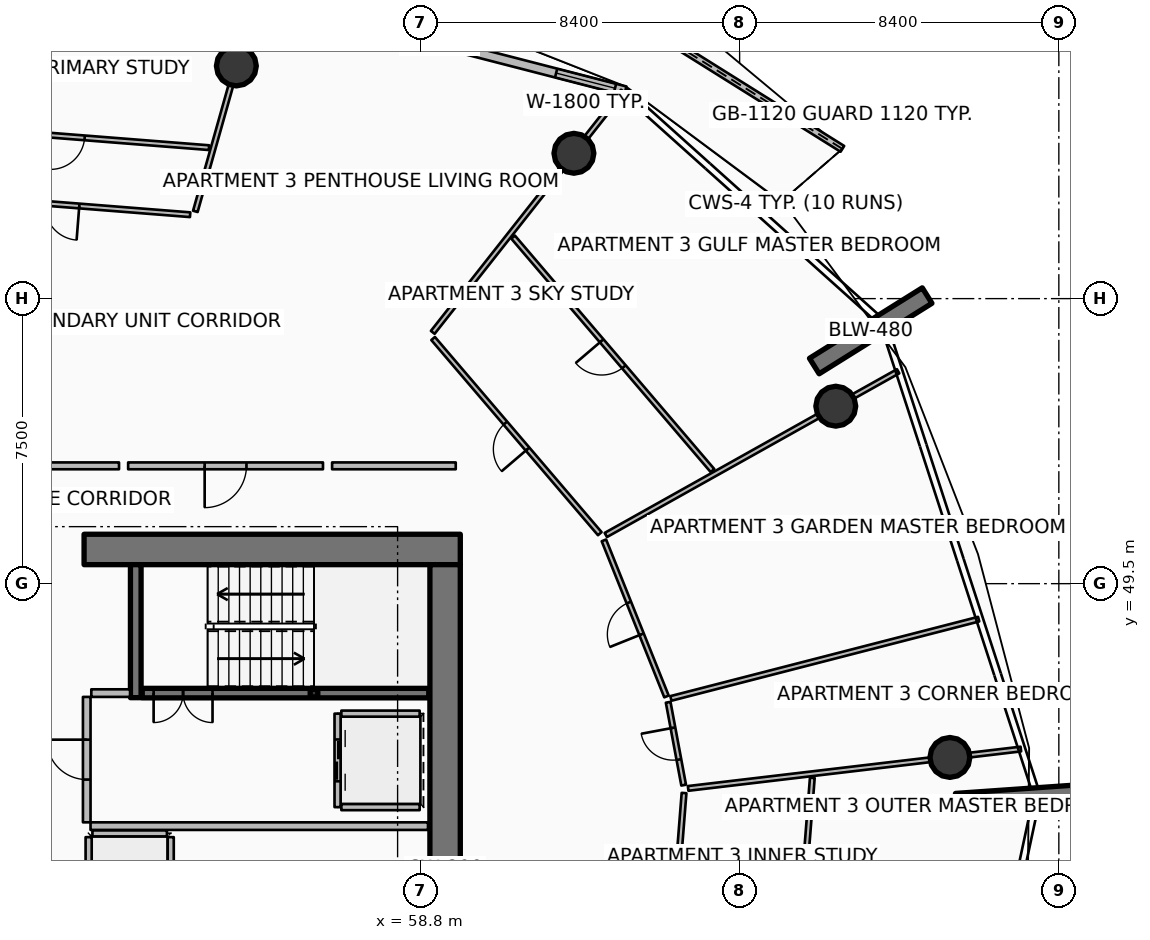
"""IFC4 building model, lengths in metres.
Left out: names, types, materials, properties, quantities, classifications, styles, units other than length and angle.
Written with IfcOpenShell. Run it as: python <this file> out.ifc"""

import sys

from ifc_helpers import new_model, si_unit, direction, frame, frame_2d, origin, origin_2d, place, context, subcontext, project, spatial, polyline, rectangle, hollow_rectangle, circle, outline, extrude, element, fill, save


model = new_model("IFC4")
c1 = context("Model", 3, precision=1e-05, world=origin(), true_north=direction((0.0, 1.0)))
c2 = subcontext(c1, "Body", "Model", "MODEL_VIEW")
j1 = project(units=[si_unit("LENGTHUNIT", "METRE"), si_unit("PLANEANGLEUNIT", "RADIAN")], contexts=[c1])
p1 = place(None, origin())
s1 = spatial("IfcSite", under=j1, at=p1, CompositionType="ELEMENT")
p2 = place(p1, origin())
s2 = spatial("IfcBuilding", under=s1, at=p2, CompositionType="ELEMENT")
p3 = place(p2, frame((0.0, 0.0, 161.55)))
s3 = spatial("IfcBuildingStorey", under=s2, at=p3, CompositionType="ELEMENT", Elevation=161.55)
p4 = place(p3, frame((49.95, 50.4, 0.0), z_axis=(0.0, 0.0, 1.0), x_axis=(1.0, 0.0, 0.0)))
e1 = element("IfcWall", 1, at=p4, inside=s3, PredefinedType="SHEAR", context=c2, shape_type="SweptSolid", body=[
    extrude(rectangle(XDim=9.9, YDim=0.8, at=frame_2d((4.95, 0.0))), origin(), (0.0, 0.0, 1.0), 3.75),
])
p5 = place(p3, frame((59.45, 34.0, 0.0), z_axis=(0.0, 0.0, 1.0), x_axis=(0.0, 1.0, 0.0)))
e2 = element("IfcWall", 2, at=p5, inside=s3, PredefinedType="SHEAR", context=c2, shape_type="SweptSolid", body=[
    extrude(rectangle(XDim=16.0, YDim=0.8, at=frame_2d((8.0, 0.0))), origin(), (0.0, 0.0, 1.0), 3.75),
])
p6 = place(p3, frame((51.31, 46.5, 0.0), z_axis=(0.0, 0.0, 1.0), x_axis=(0.0, 1.0, 0.0)))
e3 = element("IfcWall", 3, at=p6, inside=s3, PredefinedType="SHEAR", context=c2, shape_type="SweptSolid", body=[
    extrude(rectangle(XDim=3.5, YDim=0.28, at=frame_2d((1.75, 0.0))), origin(), (0.0, 0.0, 1.0), 3.75),
])
p7 = place(p3, frame((56.0, 46.62, 0.0), z_axis=(0.0, 0.0, 1.0), x_axis=(1.0, 0.0, 0.0)))
e4 = element("IfcColumn", 4, at=p7, inside=s3, PredefinedType="COLUMN", context=c2, shape_type="SweptSolid", body=[
    extrude(hollow_rectangle(XDim=0.2, YDim=0.2, WallThickness=0.01, InnerFilletRadius=0.01, OuterFilletRadius=0.02, at=origin_2d()), origin(), (0.0, 0.0, 1.0), 1.67),
])
for number, where, z_axis, x_axis in (
    (5, (69.165, 55.226, 0.0), (0.0, 0.0, 1.0), (0.848, 0.53, 0.0)),
    (6, (72.897, 43.741, 0.0), (0.0, 0.0, 1.0), (0.998, 0.07, 0.0)),
):
    element("IfcWall", number, at=place(p3, frame(where, z_axis=z_axis, x_axis=x_axis)), inside=s3, PredefinedType="SOLIDWALL", context=c2, shape_type="SweptSolid", body=[
        extrude(rectangle(XDim=3.5, YDim=0.48, at=frame_2d((1.75, 0.0))), origin(), (0.0, 0.0, 1.0), 3.75),
    ])
for number, where, z_axis, x_axis in (
    (7, (69.73, 54.169, 0.0), (0.0, 0.0, 1.0), (1.0, 0.0, 0.0)),
    (8, (62.84, 60.824, 0.0), (0.0, 0.0, 1.0), (1.0, 0.0, 0.0)),
    (9, (53.957, 63.122, 0.0), (0.0, 0.0, 1.0), (1.0, 0.0, 0.0)),
    (10, (72.733, 44.927, 0.0), (0.0, 0.0, 1.0), (1.0, 0.0, 0.0)),
):
    element("IfcColumn", number, at=place(p3, frame(where, z_axis=z_axis, x_axis=x_axis)), inside=s3, PredefinedType="COLUMN", context=c2, shape_type="SweptSolid", body=[
        extrude(circle(Radius=0.525, at=origin_2d()), origin(), (0.0, 0.0, 1.0), 3.5),
    ])
p8 = place(p3, frame((69.904, 60.94, 0.0), z_axis=(0.0, 0.0, 1.0), x_axis=(-0.847688171498, 0.53049482929, 0.0)))
e11 = element("IfcWall", 11, at=p8, inside=s3, PredefinedType="PARAPET", context=c2, shape_type="SweptSolid", body=[
    extrude(outline(polyline([(0.0, 0.0), (10.84, 0.0), (10.84, 1.832), (5.42, 1.696), (0.0, 1.497), (0.0, 0.0)])), frame((0.0, 0.09, 0.0), z_axis=(0.0, -1.0, 0.0), x_axis=(1.0, 0.0, 0.0)), (0.0, 0.0, 1.0), 0.18),
])
p9 = place(p3, frame((64.192, 62.466, 0.0), z_axis=(0.0, 0.0, 1.0), x_axis=(-0.968379685126, 0.249481032214, 0.0)))
e12 = element("IfcWall", 12, at=p9, inside=s3, PredefinedType="SOLIDWALL", context=c2, shape_type="SweptSolid", body=[
    extrude(rectangle(XDim=10.082, YDim=0.24, at=frame_2d((5.041, 0.0))), origin(), (0.0, 0.0, 1.0), 2.45),
])
p10 = place(p9, frame((7.862, 0.0, 0.0)))
e13 = element("IfcOpeningElement", 13, at=p10, cuts=e12, PredefinedType="OPENING", context=c2, shape_type="SweptSolid", body=[
    extrude(rectangle(XDim=1.45, YDim=2.15, at=frame_2d((0.725, 1.075))), frame((0.0, 0.13, 0.0), z_axis=(0.0, -1.0, 0.0), x_axis=(1.0, 0.0, 0.0)), (0.0, 0.0, 1.0), 0.26),
])
p11 = place(p9, frame((0.28, 0.0, 0.65)))
e14 = element("IfcOpeningElement", 14, at=p11, cuts=e12, PredefinedType="OPENING", context=c2, shape_type="SweptSolid", body=[
    extrude(rectangle(XDim=1.6, YDim=1.5, at=frame_2d((0.8, 0.75))), frame((0.0, 0.13, 0.0), z_axis=(0.0, -1.0, 0.0), x_axis=(1.0, 0.0, 0.0)), (0.0, 0.0, 1.0), 0.26),
])
p12 = place(p3, frame((51.48, 46.62, 0.0), z_axis=(0.0, 0.0, 1.0), x_axis=(1.0, 0.0, 0.0)))
e15 = element("IfcWall", 15, at=p12, inside=s3, PredefinedType="SOLIDWALL", context=c2, shape_type="SweptSolid", body=[
    extrude(rectangle(XDim=7.54, YDim=0.25, at=frame_2d((3.77, 0.0))), origin(), (0.0, 0.0, 1.0), 3.5),
])
p13 = place(p12, frame((0.3, 0.0, 0.0)))
e16 = element("IfcOpeningElement", 16, at=p13, cuts=e15, PredefinedType="OPENING", context=c2, shape_type="SweptSolid", body=[
    extrude(rectangle(XDim=1.55, YDim=2.15, at=frame_2d((0.775, 1.075))), frame((0.0, 0.135, 0.0), z_axis=(0.0, -1.0, 0.0), x_axis=(1.0, 0.0, 0.0)), (0.0, 0.0, 1.0), 0.27),
])
p14 = place(p3, frame((56.62, 46.08, 0.0), z_axis=(0.0, 0.0, 1.0), x_axis=(0.0, -1.0, 0.0)))
e17 = element("IfcWall", 17, at=p14, inside=s3, PredefinedType="PARTITIONING", context=c2, shape_type="SweptSolid", body=[
    extrude(rectangle(XDim=2.46, YDim=0.16, at=frame_2d((1.23, 0.0))), origin(), (0.0, 0.0, 1.0), 3.5),
])
p15 = place(p14, frame((0.68, 0.0, 0.0)))
e18 = element("IfcOpeningElement", 18, at=p15, cuts=e17, PredefinedType="OPENING", context=c2, shape_type="SweptSolid", body=[
    extrude(rectangle(XDim=1.1, YDim=2.1, at=frame_2d((0.55, 1.05))), frame((0.0, 0.09, 0.0), z_axis=(0.0, -1.0, 0.0), x_axis=(1.0, 0.0, 0.0)), (0.0, 0.0, 1.0), 0.18),
])
for number, where, z_axis, x_axis in (
    (19, (56.72, 46.08, 0.0), (0.0, 0.0, 1.0), (1.0, 0.0, 0.0)),
    (20, (56.72, 43.62, 0.0), (0.0, 0.0, 1.0), (1.0, 0.0, 0.0)),
):
    element("IfcWall", number, at=place(p3, frame(where, z_axis=z_axis, x_axis=x_axis)), inside=s3, PredefinedType="PARTITIONING", context=c2, shape_type="SweptSolid", body=[
        extrude(rectangle(XDim=2.06, YDim=0.16, at=frame_2d((1.03, 0.0))), origin(), (0.0, 0.0, 1.0), 3.5),
    ])
for number, where, z_axis, x_axis in (
    (21, (52.23, 40.67, 0.0), (0.0, 0.0, 1.0), (0.0, 1.0, 0.0)),
    (22, (50.07, 40.67, 0.0), (0.0, 0.0, 1.0), (0.0, 1.0, 0.0)),
):
    element("IfcWall", number, at=place(p3, frame(where, z_axis=z_axis, x_axis=x_axis)), inside=s3, PredefinedType="PARTITIONING", context=c2, shape_type="SweptSolid", body=[
        extrude(rectangle(XDim=2.16, YDim=0.16, at=frame_2d((1.08, 0.0))), origin(), (0.0, 0.0, 1.0), 3.5),
    ])
p16 = place(p3, frame((50.17, 42.93, 0.0), z_axis=(0.0, 0.0, 1.0), x_axis=(1.0, 0.0, 0.0)))
e23 = element("IfcWall", 23, at=p16, inside=s3, PredefinedType="PARTITIONING", context=c2, shape_type="SweptSolid", body=[
    extrude(rectangle(XDim=1.96, YDim=0.16, at=frame_2d((0.98, 0.0))), origin(), (0.0, 0.0, 1.0), 3.5),
])
p17 = place(p3, frame((50.12, 43.12, 0.0), z_axis=(0.0, 0.0, 1.0), x_axis=(1.0, 0.0, 0.0)))
e24 = element("IfcWall", 24, at=p17, inside=s3, PredefinedType="PARTITIONING", context=c2, shape_type="SweptSolid", body=[
    extrude(rectangle(XDim=8.88, YDim=0.2, at=frame_2d((4.44, 0.0))), origin(), (0.0, 0.0, 1.0), 3.5),
])
p18 = place(p3, frame((50.14, 46.62, 0.0), z_axis=(0.0, 0.0, 1.0), x_axis=(1.0, 0.0, 0.0)))
e25 = element("IfcWall", 25, at=p18, inside=s3, PredefinedType="PARTITIONING", context=c2, shape_type="SweptSolid", body=[
    extrude(rectangle(XDim=1.02, YDim=0.2, at=frame_2d((0.51, 0.0))), origin(), (0.0, 0.0, 1.0), 3.5),
])
p19 = place(p3, frame((50.02, 43.22, 0.0), z_axis=(0.0, 0.0, 1.0), x_axis=(0.0, 1.0, 0.0)))
e26 = element("IfcWall", 26, at=p19, inside=s3, PredefinedType="PARTITIONING", context=c2, shape_type="SweptSolid", body=[
    extrude(rectangle(XDim=3.3, YDim=0.2, at=frame_2d((1.65, 0.0))), origin(), (0.0, 0.0, 1.0), 3.5),
])
p20 = place(p19, frame((1.125, 0.0, 0.0)))
e27 = element("IfcOpeningElement", 27, at=p20, cuts=e26, PredefinedType="OPENING", context=c2, shape_type="SweptSolid", body=[
    extrude(rectangle(XDim=1.05, YDim=2.1, at=frame_2d((0.525, 1.05))), frame((0.0, 0.11, 0.0), z_axis=(0.0, -1.0, 0.0), x_axis=(1.0, 0.0, 0.0)), (0.0, 0.0, 1.0), 0.22),
])
p21 = place(p3, frame((56.236, 52.6, 0.0), z_axis=(0.0, 0.0, 1.0), x_axis=(-1.0, 0.0, 0.0)))
e28 = element("IfcWall", 28, at=p21, inside=s3, PredefinedType="PARTITIONING", context=c2, shape_type="SweptSolid", body=[
    extrude(rectangle(XDim=5.127, YDim=0.18, at=frame_2d((2.563, 0.0))), origin(), (0.0, 0.0, 1.0), 2.94),
])
p22 = place(p21, frame((2.013, 0.0, 0.0)))
e29 = element("IfcOpeningElement", 29, at=p22, cuts=e28, PredefinedType="OPENING", context=c2, shape_type="SweptSolid", body=[
    extrude(rectangle(XDim=1.1, YDim=2.1, at=frame_2d((0.55, 1.05))), frame((0.0, 0.1, 0.0), z_axis=(0.0, -1.0, 0.0), x_axis=(1.0, 0.0, 0.0)), (0.0, 0.0, 1.0), 0.2),
])
p23 = place(p3, frame((65.208, 37.259, 0.0), z_axis=(0.0, 0.0, 1.0), x_axis=(0.078457580711, 0.996917452966, 0.0)))
e30 = element("IfcWall", 30, at=p23, inside=s3, PredefinedType="PARTITIONING", context=c2, shape_type="SweptSolid", body=[
    extrude(rectangle(XDim=6.752, YDim=0.125, at=frame_2d((3.376, 0.0))), origin(), (0.0, 0.0, 1.0), 2.94),
])
p24 = place(p23, frame((2.926, 0.0, 0.0)))
e31 = element("IfcOpeningElement", 31, at=p24, cuts=e30, PredefinedType="OPENING", context=c2, shape_type="SweptSolid", body=[
    extrude(rectangle(XDim=0.9, YDim=2.08, at=frame_2d((0.45, 1.04))), frame((0.0, 0.073, 0.0), z_axis=(0.0, -1.0, 0.0), x_axis=(1.0, 0.0, 0.0)), (0.0, 0.0, 1.0), 0.145),
])
p25 = place(p3, frame((68.479, 36.336, 0.0), z_axis=(0.0, 0.0, 1.0), x_axis=(0.078482765766, 0.996915470578, 0.0)))
e32 = element("IfcWall", 32, at=p25, inside=s3, PredefinedType="PARTITIONING", context=c2, shape_type="SweptSolid", body=[
    extrude(rectangle(XDim=8.079, YDim=0.125, at=frame_2d((4.039, 0.0))), origin(), (0.0, 0.0, 1.0), 2.94),
])
p26 = place(p25, frame((3.589, 0.0, 0.0)))
e33 = element("IfcOpeningElement", 33, at=p26, cuts=e32, PredefinedType="OPENING", context=c2, shape_type="SweptSolid", body=[
    extrude(rectangle(XDim=0.9, YDim=2.08, at=frame_2d((0.45, 1.04))), frame((0.0, 0.073, 0.0), z_axis=(0.0, -1.0, 0.0), x_axis=(1.0, 0.0, 0.0)), (0.0, 0.0, 1.0), 0.145),
])
p27 = place(p3, frame((65.845, 44.112, 0.0), z_axis=(0.0, 0.0, 1.0), x_axis=(0.993069843717, 0.117525680174, 0.0)))
e34 = element("IfcWall", 34, at=p27, inside=s3, PredefinedType="PARTITIONING", context=c2, shape_type="SweptSolid", body=[
    extrude(rectangle(XDim=8.816, YDim=0.125, at=frame_2d((4.408, 0.0))), origin(), (0.0, 0.0, 1.0), 2.94),
])
p28 = place(p3, frame((65.392, 46.48, 0.0), z_axis=(0.0, 0.0, 1.0), x_axis=(0.968391846752, 0.249433821172, 0.0)))
e35 = element("IfcWall", 35, at=p28, inside=s3, PredefinedType="PARTITIONING", context=c2, shape_type="SweptSolid", body=[
    extrude(rectangle(XDim=8.362, YDim=0.125, at=frame_2d((4.181, 0.0))), origin(), (0.0, 0.0, 1.0), 2.94),
])
p29 = place(p3, frame((65.728, 44.199, 0.0), z_axis=(0.0, 0.0, 1.0), x_axis=(-0.183909749888, 0.982943133602, 0.0)))
e36 = element("IfcWall", 36, at=p29, inside=s3, PredefinedType="PARTITIONING", context=c2, shape_type="SweptSolid", body=[
    extrude(rectangle(XDim=2.218, YDim=0.125, at=frame_2d((1.109, 0.0))), origin(), (0.0, 0.0, 1.0), 2.94),
])
p30 = place(p29, frame((0.684, 0.0, 0.0)))
e37 = element("IfcOpeningElement", 37, at=p30, cuts=e36, PredefinedType="OPENING", context=c2, shape_type="SweptSolid", body=[
    extrude(rectangle(XDim=0.85, YDim=2.06, at=frame_2d((0.425, 1.03))), frame((0.0, 0.073, 0.0), z_axis=(0.0, -1.0, 0.0), x_axis=(1.0, 0.0, 0.0)), (0.0, 0.0, 1.0), 0.145),
])
p31 = place(p3, frame((65.275, 46.532, 0.0), z_axis=(0.0, 0.0, 1.0), x_axis=(-0.372161107737, 0.928168147421, 0.0)))
e38 = element("IfcWall", 38, at=p31, inside=s3, PredefinedType="PARTITIONING", context=c2, shape_type="SweptSolid", body=[
    extrude(rectangle(XDim=4.425, YDim=0.125, at=frame_2d((2.212, 0.0))), origin(), (0.0, 0.0, 1.0), 2.94),
])
p32 = place(p31, frame((1.762, 0.0, 0.0)))
e39 = element("IfcOpeningElement", 39, at=p32, cuts=e38, PredefinedType="OPENING", context=c2, shape_type="SweptSolid", body=[
    extrude(rectangle(XDim=0.9, YDim=2.08, at=frame_2d((0.45, 1.04))), frame((0.0, 0.073, 0.0), z_axis=(0.0, -1.0, 0.0), x_axis=(1.0, 0.0, 0.0)), (0.0, 0.0, 1.0), 0.145),
])
p33 = place(p3, frame((59.73, 52.6, 0.0), z_axis=(0.0, 0.0, 1.0), x_axis=(-1.0, 0.0, 0.0)))
e40 = element("IfcWall", 40, at=p33, inside=s3, PredefinedType="PARTITIONING", context=c2, shape_type="SweptSolid", body=[
    extrude(rectangle(XDim=3.254, YDim=0.18, at=frame_2d((1.627, 0.0))), origin(), (0.0, 0.0, 1.0), 2.94),
])
p34 = place(p3, frame((63.679, 50.781, 0.0), z_axis=(0.0, 0.0, 1.0), x_axis=(0.872493265844, 0.488626136281, 0.0)))
e41 = element("IfcWall", 41, at=p34, inside=s3, PredefinedType="PARTITIONING", context=c2, shape_type="SweptSolid", body=[
    extrude(rectangle(XDim=8.816, YDim=0.125, at=frame_2d((4.408, 0.0))), origin(), (0.0, 0.0, 1.0), 2.94),
])
p35 = place(p3, frame((59.125, 56.112, 0.0), z_axis=(0.0, 0.0, 1.0), x_axis=(0.61910151414, 0.78531096719, 0.0)))
e42 = element("IfcWall", 42, at=p35, inside=s3, PredefinedType="PARTITIONING", context=c2, shape_type="SweptSolid", body=[
    extrude(rectangle(XDim=8.082, YDim=0.125, at=frame_2d((4.041, 0.0))), origin(), (0.0, 0.0, 1.0), 2.94),
])
p36 = place(p3, frame((63.52, 50.815, 0.0), z_axis=(0.0, 0.0, 1.0), x_axis=(-0.649447526186, 0.760406411553, 0.0)))
e43 = element("IfcWall", 43, at=p36, inside=s3, PredefinedType="PARTITIONING", context=c2, shape_type="SweptSolid", body=[
    extrude(rectangle(XDim=6.753, YDim=0.125, at=frame_2d((3.376, 0.0))), origin(), (0.0, 0.0, 1.0), 2.94),
])
p37 = place(p36, frame((2.926, 0.0, 0.0)))
e44 = element("IfcOpeningElement", 44, at=p37, cuts=e43, PredefinedType="OPENING", context=c2, shape_type="SweptSolid", body=[
    extrude(rectangle(XDim=0.9, YDim=2.08, at=frame_2d((0.45, 1.04))), frame((0.0, 0.073, 0.0), z_axis=(0.0, -1.0, 0.0), x_axis=(1.0, 0.0, 0.0)), (0.0, 0.0, 1.0), 0.145),
])
p38 = place(p3, frame((66.486, 52.476, 0.0), z_axis=(0.0, 0.0, 1.0), x_axis=(-0.649426515446, 0.760424355894, 0.0)))
e45 = element("IfcWall", 45, at=p38, inside=s3, PredefinedType="PARTITIONING", context=c2, shape_type="SweptSolid", body=[
    extrude(rectangle(XDim=8.079, YDim=0.125, at=frame_2d((4.04, 0.0))), origin(), (0.0, 0.0, 1.0), 2.94),
])
p39 = place(p38, frame((3.589, 0.0, 0.0)))
e46 = element("IfcOpeningElement", 46, at=p39, cuts=e45, PredefinedType="OPENING", context=c2, shape_type="SweptSolid", body=[
    extrude(rectangle(XDim=0.9, YDim=2.08, at=frame_2d((0.45, 1.04))), frame((0.0, 0.073, 0.0), z_axis=(0.0, -1.0, 0.0), x_axis=(1.0, 0.0, 0.0)), (0.0, 0.0, 1.0), 0.145),
])
p40 = place(p3, frame((50.869, 52.6, 0.0), z_axis=(0.0, 0.0, 1.0), x_axis=(-1.0, 0.0, 0.0)))
e47 = element("IfcWall", 47, at=p40, inside=s3, PredefinedType="PARTITIONING", context=c2, shape_type="SweptSolid", body=[
    extrude(rectangle(XDim=4.004, YDim=0.18, at=frame_2d((2.002, 0.0))), origin(), (0.0, 0.0, 1.0), 2.94),
])
p41 = place(p3, frame((52.878, 59.295, 0.0), z_axis=(0.0, 0.0, 1.0), x_axis=(0.271461170106, 0.962449392501, 0.0)))
e48 = element("IfcWall", 48, at=p41, inside=s3, PredefinedType="PARTITIONING", context=c2, shape_type="SweptSolid", body=[
    extrude(rectangle(XDim=5.769, YDim=0.125, at=frame_2d((2.885, 0.0))), origin(), (0.0, 0.0, 1.0), 2.94),
])
p42 = place(p3, frame((52.741, 59.208, 0.0), z_axis=(0.0, 0.0, 1.0), x_axis=(-0.996917452966, 0.078457580711, 0.0)))
e49 = element("IfcWall", 49, at=p42, inside=s3, PredefinedType="PARTITIONING", context=c2, shape_type="SweptSolid", body=[
    extrude(rectangle(XDim=6.752, YDim=0.125, at=frame_2d((3.376, 0.0))), origin(), (0.0, 0.0, 1.0), 2.94),
])
p43 = place(p42, frame((2.926, 0.0, 0.0)))
e50 = element("IfcOpeningElement", 50, at=p43, cuts=e49, PredefinedType="OPENING", context=c2, shape_type="SweptSolid", body=[
    extrude(rectangle(XDim=0.9, YDim=2.08, at=frame_2d((0.45, 1.04))), frame((0.0, 0.073, 0.0), z_axis=(0.0, -1.0, 0.0), x_axis=(1.0, 0.0, 0.0)), (0.0, 0.0, 1.0), 0.145),
])
p44 = place(p3, frame((53.239, 60.972, 0.0), z_axis=(0.0, 0.0, 1.0), x_axis=(-0.996916953075, 0.078463932292, 0.0)))
e51 = element("IfcWall", 51, at=p44, inside=s3, PredefinedType="PARTITIONING", context=c2, shape_type="SweptSolid", body=[
    extrude(rectangle(XDim=7.468, YDim=0.125, at=frame_2d((3.734, 0.0))), origin(), (0.0, 0.0, 1.0), 2.94),
])
p45 = place(p44, frame((3.284, 0.0, 0.0)))
e52 = element("IfcOpeningElement", 52, at=p45, cuts=e51, PredefinedType="OPENING", context=c2, shape_type="SweptSolid", body=[
    extrude(rectangle(XDim=0.9, YDim=2.08, at=frame_2d((0.45, 1.04))), frame((0.0, 0.073, 0.0), z_axis=(0.0, -1.0, 0.0), x_axis=(1.0, 0.0, 0.0)), (0.0, 0.0, 1.0), 0.145),
])
p46 = place(p11, origin())
e53 = element("IfcWindow", 53, at=p46, inside=s3, PartitioningType="SINGLE_PANEL", PredefinedType="WINDOW", context=c2, shape_type="SweptSolid", body=[
    extrude(rectangle(XDim=1.6, YDim=1.5, at=frame_2d((0.8, 0.75))), frame((0.0, 0.03, 0.0), z_axis=(0.0, -1.0, 0.0), x_axis=(1.0, 0.0, 0.0)), (0.0, 0.0, 1.0), 0.06),
])
fill(e14, e53)
p47 = place(p13, origin())
e54 = element("IfcDoor", 54, at=p47, inside=s3, OperationType="DOUBLE_DOOR_SINGLE_SWING", PredefinedType="DOOR", context=c2, shape_type="SweptSolid", body=[
    extrude(rectangle(XDim=1.55, YDim=2.15, at=frame_2d((0.775, 1.075))), frame((0.0, 0.025, 0.0), z_axis=(0.0, -1.0, 0.0), x_axis=(1.0, 0.0, 0.0)), (0.0, 0.0, 1.0), 0.05),
])
fill(e16, e54)
p48 = place(p15, origin())
e55 = element("IfcDoor", 55, at=p48, inside=s3, OperationType="DOUBLE_DOOR_SLIDING", PredefinedType="DOOR", context=c2, shape_type="SweptSolid", body=[
    extrude(rectangle(XDim=1.1, YDim=2.1, at=frame_2d((0.55, 1.05))), frame((0.0, 0.025, 0.0), z_axis=(0.0, -1.0, 0.0), x_axis=(1.0, 0.0, 0.0)), (0.0, 0.0, 1.0), 0.05),
])
fill(e18, e55)
p49 = place(p20, origin())
e56 = element("IfcDoor", 56, at=p49, inside=s3, OperationType="SINGLE_SWING_RIGHT", PredefinedType="DOOR", context=c2, shape_type="SweptSolid", body=[
    extrude(rectangle(XDim=1.05, YDim=2.1, at=frame_2d((0.525, 1.05))), frame((0.0, 0.025, 0.0), z_axis=(0.0, -1.0, 0.0), x_axis=(1.0, 0.0, 0.0)), (0.0, 0.0, 1.0), 0.05),
])
fill(e27, e56)
p50 = place(p22, origin())
e57 = element("IfcDoor", 57, at=p50, inside=s3, OperationType="SINGLE_SWING_RIGHT", PredefinedType="DOOR", context=c2, shape_type="SweptSolid", body=[
    extrude(rectangle(XDim=1.1, YDim=2.1, at=frame_2d((0.55, 1.05))), frame((0.0, 0.025, 0.0), z_axis=(0.0, -1.0, 0.0), x_axis=(1.0, 0.0, 0.0)), (0.0, 0.0, 1.0), 0.05),
])
fill(e29, e57)
p51 = place(p30, origin())
e58 = element("IfcDoor", 58, at=p51, inside=s3, OperationType="SINGLE_SWING_RIGHT", PredefinedType="DOOR", context=c2, shape_type="SweptSolid", body=[
    extrude(rectangle(XDim=0.85, YDim=2.06, at=frame_2d((0.425, 1.03))), frame((0.0, 0.025, 0.0), z_axis=(0.0, -1.0, 0.0), x_axis=(1.0, 0.0, 0.0)), (0.0, 0.0, 1.0), 0.05),
])
fill(e37, e58)
p52 = place(p32, origin())
e59 = element("IfcDoor", 59, at=p52, inside=s3, OperationType="SINGLE_SWING_LEFT", PredefinedType="DOOR", context=c2, shape_type="SweptSolid", body=[
    extrude(rectangle(XDim=0.9, YDim=2.08, at=frame_2d((0.45, 1.04))), frame((0.0, 0.025, 0.0), z_axis=(0.0, -1.0, 0.0), x_axis=(1.0, 0.0, 0.0)), (0.0, 0.0, 1.0), 0.05),
])
fill(e39, e59)
p53 = place(p37, origin())
e60 = element("IfcDoor", 60, at=p53, inside=s3, OperationType="SINGLE_SWING_LEFT", PredefinedType="DOOR", context=c2, shape_type="SweptSolid", body=[
    extrude(rectangle(XDim=0.9, YDim=2.08, at=frame_2d((0.45, 1.04))), frame((0.0, 0.025, 0.0), z_axis=(0.0, -1.0, 0.0), x_axis=(1.0, 0.0, 0.0)), (0.0, 0.0, 1.0), 0.05),
])
fill(e44, e60)
p54 = place(p39, origin())
e61 = element("IfcDoor", 61, at=p54, inside=s3, OperationType="SINGLE_SWING_RIGHT", PredefinedType="DOOR", context=c2, shape_type="SweptSolid", body=[
    extrude(rectangle(XDim=0.9, YDim=2.08, at=frame_2d((0.45, 1.04))), frame((0.0, 0.025, 0.0), z_axis=(0.0, -1.0, 0.0), x_axis=(1.0, 0.0, 0.0)), (0.0, 0.0, 1.0), 0.05),
])
fill(e46, e61)
p55 = place(p43, origin())
e62 = element("IfcDoor", 62, at=p55, inside=s3, OperationType="SINGLE_SWING_LEFT", PredefinedType="DOOR", context=c2, shape_type="SweptSolid", body=[
    extrude(rectangle(XDim=0.9, YDim=2.08, at=frame_2d((0.45, 1.04))), frame((0.0, 0.025, 0.0), z_axis=(0.0, -1.0, 0.0), x_axis=(1.0, 0.0, 0.0)), (0.0, 0.0, 1.0), 0.05),
])
fill(e50, e62)
p56 = place(p45, origin())
e63 = element("IfcDoor", 63, at=p56, inside=s3, OperationType="SINGLE_SWING_RIGHT", PredefinedType="DOOR", context=c2, shape_type="SweptSolid", body=[
    extrude(rectangle(XDim=0.9, YDim=2.08, at=frame_2d((0.45, 1.04))), frame((0.0, 0.025, 0.0), z_axis=(0.0, -1.0, 0.0), x_axis=(1.0, 0.0, 0.0)), (0.0, 0.0, 1.0), 0.05),
])
fill(e52, e63)
save(model, sys.argv[1])
